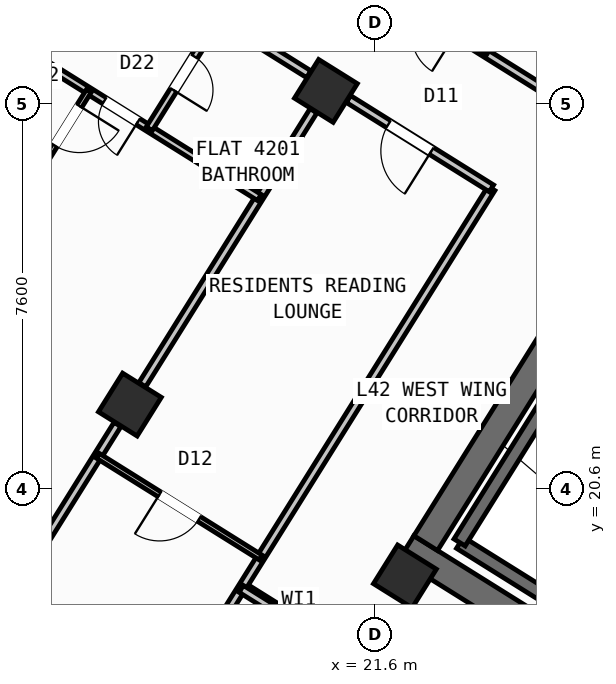
"""IFC4 building model, lengths in metres.
Left out: names, types, materials, properties, quantities, classifications, styles, units other than length and angle.
Written with IfcOpenShell. Run it as: python <this file> out.ifc"""

import sys

from ifc_helpers import new_model, si_unit, direction, frame, frame_2d, origin, origin_2d, place, context, subcontext, project, spatial, rectangle, hollow_rectangle, extrude, source, transform, mapped, element, fill, save


model = new_model("IFC4")
c1 = context("Model", 3, precision=1e-05, world=origin(), true_north=direction((0.0, 1.0)))
c2 = subcontext(c1, "Body", "Model", "MODEL_VIEW")
j1 = project(units=[si_unit("LENGTHUNIT", "METRE"), si_unit("PLANEANGLEUNIT", "RADIAN")], contexts=[c1])
p1 = place(None, origin())
s1 = spatial("IfcSite", under=j1, at=p1, CompositionType="ELEMENT")
p2 = place(p1, origin())
s2 = spatial("IfcBuilding", under=s1, at=p2, CompositionType="ELEMENT")
p3 = place(p2, frame((0.0, 0.0, 165.9)))
s3 = spatial("IfcBuildingStorey", under=s2, at=p3, CompositionType="ELEMENT", Elevation=165.9)
p4 = place(p3, frame((33.366, 12.477, 0.0), z_axis=(0.0, 0.0, 1.0), x_axis=(-0.848047359947, 0.529920442413, 0.0)))
e1 = element("IfcWall", 1, at=p4, inside=s3, PredefinedType="SHEAR", context=c2, shape_type="SweptSolid", body=[
    extrude(rectangle(XDim=13.14, YDim=0.55, at=frame_2d((6.57, 0.0))), origin(), (0.0, 0.0, 1.0), 3.32),
])
p5 = place(p3, frame((26.007, 24.976, 0.0), z_axis=(0.0, 0.0, 1.0), x_axis=(-0.529923795287, -0.848045264823, 0.0)))
e2 = element("IfcWall", 2, at=p5, inside=s3, PredefinedType="SHEAR", context=c2, shape_type="SweptSolid", body=[
    extrude(rectangle(XDim=6.425, YDim=0.55, at=frame_2d((3.212, 0.0))), origin(), (0.0, 0.0, 1.0), 3.32),
])
m1 = source(origin(), c2, "Body", "SweptSolid", [
    extrude(hollow_rectangle(XDim=0.9, YDim=0.9, WallThickness=0.036, at=origin_2d()), origin(), (0.0, 0.0, 1.0), 3.6),
])
for number, where, z_axis, x_axis in (
    (3, (22.191, 18.87, 0.0), (0.0, 0.0, 1.0), (-0.848, 0.53, 0.0)),
    (4, (20.632, 28.452, 0.0), (0.0, 0.0, 1.0), (-0.848, 0.53, 0.0)),
    (5, (16.764, 22.261, 0.0), (0.0, 0.0, 1.0), (-0.848, 0.53, 0.0)),
):
    element("IfcColumn", number, at=place(p3, frame(where, z_axis=z_axis, x_axis=x_axis)), inside=s3, PredefinedType="COLUMN", context=c2, shape_type="MappedRepresentation", body=[
        mapped(m1, transform((0.0, 0.0, 0.0), scale=1.0)),
    ])
p6 = place(p3, frame((29.268, 6.429, 0.0), z_axis=(0.0, 0.0, 1.0), x_axis=(-0.848049971435, 0.529916263149, 0.0)))
e6 = element("IfcWall", 6, at=p6, inside=s3, PredefinedType="STANDARD", context=c2, shape_type="SweptSolid", body=[
    extrude(rectangle(XDim=31.588, YDim=0.32, at=frame_2d((15.794, 0.0))), origin(), (0.0, 0.0, 1.0), 3.32),
])
p7 = place(p6, frame((16.362, 0.0, 0.0)))
e7 = element("IfcOpeningElement", 7, at=p7, cuts=e6, PredefinedType="OPENING", context=c2, shape_type="SweptSolid", body=[
    extrude(rectangle(XDim=1.2, YDim=2.15, at=frame_2d((0.6, 1.075))), frame((0.0, 0.17, 0.0), z_axis=(0.0, -1.0, 0.0), x_axis=(1.0, 0.0, 0.0)), (0.0, 0.0, 1.0), 0.34),
])
p8 = place(p6, frame((2.989, 0.0, 0.8)))
e8 = element("IfcOpeningElement", 8, at=p8, cuts=e6, PredefinedType="OPENING", context=c2, shape_type="SweptSolid", body=[
    extrude(rectangle(XDim=2.1, YDim=1.55, at=frame_2d((1.05, 0.775))), frame((0.0, 0.17, 0.0), z_axis=(0.0, -1.0, 0.0), x_axis=(1.0, 0.0, 0.0)), (0.0, 0.0, 1.0), 0.34),
])
p9 = place(p6, frame((8.359, 0.0, 0.8)))
e9 = element("IfcOpeningElement", 9, at=p9, cuts=e6, PredefinedType="OPENING", context=c2, shape_type="SweptSolid", body=[
    extrude(rectangle(XDim=2.1, YDim=1.55, at=frame_2d((1.05, 0.775))), frame((0.0, 0.17, 0.0), z_axis=(0.0, -1.0, 0.0), x_axis=(1.0, 0.0, 0.0)), (0.0, 0.0, 1.0), 0.34),
])
p10 = place(p6, frame((13.284, 0.0, 0.95)))
e10 = element("IfcOpeningElement", 10, at=p10, cuts=e6, PredefinedType="OPENING", context=c2, shape_type="SweptSolid", body=[
    extrude(rectangle(XDim=1.2, YDim=1.4, at=frame_2d((0.6, 0.7))), frame((0.0, 0.17, 0.0), z_axis=(0.0, -1.0, 0.0), x_axis=(1.0, 0.0, 0.0)), (0.0, 0.0, 1.0), 0.34),
])
p11 = place(p6, frame((20.39, 0.0, 0.95)))
e11 = element("IfcOpeningElement", 11, at=p11, cuts=e6, PredefinedType="OPENING", context=c2, shape_type="SweptSolid", body=[
    extrude(rectangle(XDim=1.2, YDim=1.4, at=frame_2d((0.6, 0.7))), frame((0.0, 0.17, 0.0), z_axis=(0.0, -1.0, 0.0), x_axis=(1.0, 0.0, 0.0)), (0.0, 0.0, 1.0), 0.34),
])
p12 = place(p6, frame((23.715, 0.0, 1.0)))
e12 = element("IfcOpeningElement", 12, at=p12, cuts=e6, PredefinedType="OPENING", context=c2, shape_type="SweptSolid", body=[
    extrude(rectangle(XDim=0.9, YDim=1.25, at=frame_2d((0.45, 0.625))), frame((0.0, 0.17, 0.0), z_axis=(0.0, -1.0, 0.0), x_axis=(1.0, 0.0, 0.0)), (0.0, 0.0, 1.0), 0.34),
])
p13 = place(p6, frame((26.106, 0.0, 0.85)))
e13 = element("IfcOpeningElement", 13, at=p13, cuts=e6, PredefinedType="OPENING", context=c2, shape_type="SweptSolid", body=[
    extrude(rectangle(XDim=1.5, YDim=1.5, at=frame_2d((0.75, 0.75))), frame((0.0, 0.17, 0.0), z_axis=(0.0, -1.0, 0.0), x_axis=(1.0, 0.0, 0.0)), (0.0, 0.0, 1.0), 0.34),
])
p14 = place(p6, frame((29.068, 0.0, 0.85)))
e14 = element("IfcOpeningElement", 14, at=p14, cuts=e6, PredefinedType="OPENING", context=c2, shape_type="SweptSolid", body=[
    extrude(rectangle(XDim=1.8, YDim=1.5, at=frame_2d((0.9, 0.75))), frame((0.0, 0.17, 0.0), z_axis=(0.0, -1.0, 0.0), x_axis=(1.0, 0.0, 0.0)), (0.0, 0.0, 1.0), 0.34),
])
p15 = place(p3, frame((14.138, 41.825, 0.0), z_axis=(0.0, 0.0, 1.0), x_axis=(0.848046498049, -0.529921821731, 0.0)))
e15 = element("IfcWall", 15, at=p15, inside=s3, PredefinedType="STANDARD", context=c2, shape_type="SweptSolid", body=[
    extrude(rectangle(XDim=31.588, YDim=0.32, at=frame_2d((15.794, 0.0))), origin(), (0.0, 0.0, 1.0), 3.32),
])
p16 = place(p15, frame((3.253, 0.0, 0.0)))
e16 = element("IfcOpeningElement", 16, at=p16, cuts=e15, PredefinedType="OPENING", context=c2, shape_type="SweptSolid", body=[
    extrude(rectangle(XDim=1.05, YDim=2.15, at=frame_2d((0.525, 1.075))), frame((0.0, 0.17, 0.0), z_axis=(0.0, -1.0, 0.0), x_axis=(1.0, 0.0, 0.0)), (0.0, 0.0, 1.0), 0.34),
])
p17 = place(p15, frame((0.863, 0.0, 0.85)))
e17 = element("IfcOpeningElement", 17, at=p17, cuts=e15, PredefinedType="OPENING", context=c2, shape_type="SweptSolid", body=[
    extrude(rectangle(XDim=1.8, YDim=1.5, at=frame_2d((0.9, 0.75))), frame((0.0, 0.17, 0.0), z_axis=(0.0, -1.0, 0.0), x_axis=(1.0, 0.0, 0.0)), (0.0, 0.0, 1.0), 0.34),
])
p18 = place(p15, frame((8.494, 0.0, 0.85)))
e18 = element("IfcOpeningElement", 18, at=p18, cuts=e15, PredefinedType="OPENING", context=c2, shape_type="SweptSolid", body=[
    extrude(rectangle(XDim=1.8, YDim=1.5, at=frame_2d((0.9, 0.75))), frame((0.0, 0.17, 0.0), z_axis=(0.0, -1.0, 0.0), x_axis=(1.0, 0.0, 0.0)), (0.0, 0.0, 1.0), 0.34),
])
p19 = place(p15, frame((13.874, 0.0, 0.85)))
e19 = element("IfcOpeningElement", 19, at=p19, cuts=e15, PredefinedType="OPENING", context=c2, shape_type="SweptSolid", body=[
    extrude(rectangle(XDim=1.5, YDim=1.5, at=frame_2d((0.75, 0.75))), frame((0.0, 0.17, 0.0), z_axis=(0.0, -1.0, 0.0), x_axis=(1.0, 0.0, 0.0)), (0.0, 0.0, 1.0), 0.34),
])
p20 = place(p15, frame((17.104, 0.0, 1.0)))
e20 = element("IfcOpeningElement", 20, at=p20, cuts=e15, PredefinedType="OPENING", context=c2, shape_type="SweptSolid", body=[
    extrude(rectangle(XDim=0.9, YDim=1.25, at=frame_2d((0.45, 0.625))), frame((0.0, 0.17, 0.0), z_axis=(0.0, -1.0, 0.0), x_axis=(1.0, 0.0, 0.0)), (0.0, 0.0, 1.0), 0.34),
])
p21 = place(p15, frame((22.144, 0.0, 1.0)))
e21 = element("IfcOpeningElement", 21, at=p21, cuts=e15, PredefinedType="OPENING", context=c2, shape_type="SweptSolid", body=[
    extrude(rectangle(XDim=0.9, YDim=1.25, at=frame_2d((0.45, 0.625))), frame((0.0, 0.17, 0.0), z_axis=(0.0, -1.0, 0.0), x_axis=(1.0, 0.0, 0.0)), (0.0, 0.0, 1.0), 0.34),
])
p22 = place(p15, frame((27.744, 0.0, 1.0)))
e22 = element("IfcOpeningElement", 22, at=p22, cuts=e15, PredefinedType="OPENING", context=c2, shape_type="SweptSolid", body=[
    extrude(rectangle(XDim=0.9, YDim=1.25, at=frame_2d((0.45, 0.625))), frame((0.0, 0.17, 0.0), z_axis=(0.0, -1.0, 0.0), x_axis=(1.0, 0.0, 0.0)), (0.0, 0.0, 1.0), 0.34),
])
p23 = place(p3, frame((29.605, 15.581, 0.0), z_axis=(0.0, 0.0, 1.0), x_axis=(-0.848036911448, 0.529937163087, 0.0)))
e23 = element("IfcWall", 23, at=p23, inside=s3, PredefinedType="SHEAR", context=c2, shape_type="SweptSolid", body=[
    extrude(rectangle(XDim=7.46, YDim=0.26, at=frame_2d((3.73, 0.0))), origin(), (0.0, 0.0, 1.0), 3.32),
])
p24 = place(p3, frame((24.945, 22.22, 0.0), z_axis=(0.0, 0.0, 1.0), x_axis=(-0.529908658664, -0.84805472316, 0.0)))
e24 = element("IfcWall", 24, at=p24, inside=s3, PredefinedType="SHEAR", context=c2, shape_type="SweptSolid", body=[
    extrude(rectangle(XDim=3.16, YDim=0.26, at=frame_2d((1.58, 0.0))), origin(), (0.0, 0.0, 1.0), 3.32),
])
p25 = place(p3, frame((21.206, 17.292, 0.0), z_axis=(0.0, 0.0, 1.0), x_axis=(-0.848050851465, 0.529914854792, 0.0)))
e25 = element("IfcWall", 25, at=p25, inside=s3, PredefinedType="PARTITIONING", context=c2, shape_type="SweptSolid", body=[
    extrude(rectangle(XDim=2.61, YDim=0.16, at=frame_2d((1.305, 0.0))), origin(), (0.0, 0.0, 1.0), 3.31),
])
p26 = place(p3, frame((23.899, 26.529, 0.0), z_axis=(0.0, 0.0, 1.0), x_axis=(-0.529917716469, -0.848049063305, 0.0)))
e26 = element("IfcWall", 26, at=p26, inside=s3, PredefinedType="PARTITIONING", context=c2, shape_type="SweptSolid", body=[
    extrude(rectangle(XDim=14.05, YDim=0.16, at=frame_2d((7.025, 0.0))), origin(), (0.0, 0.0, 1.0), 3.31),
])
p27 = place(p3, frame((25.065, 28.394, 0.0), z_axis=(0.0, 0.0, 1.0), x_axis=(-0.848048310262, 0.529918921593, 0.0)))
e27 = element("IfcWall", 27, at=p27, inside=s3, PredefinedType="PARTITIONING", context=c2, shape_type="SweptSolid", body=[
    extrude(rectangle(XDim=16.73, YDim=0.16, at=frame_2d((8.365, 0.0))), origin(), (0.0, 0.0, 1.0), 3.31),
])
p28 = place(p27, frame((2.22, 0.0, 0.0)))
e28 = element("IfcOpeningElement", 28, at=p28, cuts=e27, PredefinedType="OPENING", context=c2, shape_type="SweptSolid", body=[
    extrude(rectangle(XDim=0.86, YDim=2.05, at=frame_2d((0.43, 1.025))), frame((0.0, 0.09, 0.0), z_axis=(0.0, -1.0, 0.0), x_axis=(1.0, 0.0, 0.0)), (0.0, 0.0, 1.0), 0.18),
])
p29 = place(p27, frame((7.82, 0.0, 0.0)))
e29 = element("IfcOpeningElement", 29, at=p29, cuts=e27, PredefinedType="OPENING", context=c2, shape_type="SweptSolid", body=[
    extrude(rectangle(XDim=1.0, YDim=2.1, at=frame_2d((0.5, 1.05))), frame((0.0, 0.09, 0.0), z_axis=(0.0, -1.0, 0.0), x_axis=(1.0, 0.0, 0.0)), (0.0, 0.0, 1.0), 0.18),
])
p30 = place(p27, frame((12.95, 0.0, 0.0)))
e30 = element("IfcOpeningElement", 30, at=p30, cuts=e27, PredefinedType="OPENING", context=c2, shape_type="SweptSolid", body=[
    extrude(rectangle(XDim=1.0, YDim=2.1, at=frame_2d((0.5, 1.05))), frame((0.0, 0.09, 0.0), z_axis=(0.0, -1.0, 0.0), x_axis=(1.0, 0.0, 0.0)), (0.0, 0.0, 1.0), 0.18),
])
p31 = place(p3, frame((23.899, 26.529, 0.0), z_axis=(0.0, 0.0, 1.0), x_axis=(-0.848064240775, 0.529893426567, 0.0)))
e31 = element("IfcWall", 31, at=p31, inside=s3, PredefinedType="PARTITIONING", context=c2, shape_type="SweptSolid", body=[
    extrude(rectangle(XDim=3.328, YDim=0.16, at=frame_2d((1.664, 0.0))), origin(), (0.0, 0.0, 1.0), 2.795),
])
p32 = place(p31, frame((1.395, 0.0, 0.0)))
e32 = element("IfcOpeningElement", 32, at=p32, cuts=e31, PredefinedType="OPENING", context=c2, shape_type="SweptSolid", body=[
    extrude(rectangle(XDim=1.0, YDim=2.1, at=frame_2d((0.5, 1.05))), frame((0.0, 0.09, 0.0), z_axis=(0.0, -1.0, 0.0), x_axis=(1.0, 0.0, 0.0)), (0.0, 0.0, 1.0), 0.18),
])
p33 = place(p3, frame((20.293, 28.782, 0.0), z_axis=(0.0, 0.0, 1.0), x_axis=(-0.848040881926, 0.529930809241, 0.0)))
e33 = element("IfcWall", 33, at=p33, inside=s3, PredefinedType="PARTITIONING", context=c2, shape_type="SweptSolid", body=[
    extrude(rectangle(XDim=5.476, YDim=0.16, at=frame_2d((2.738, 0.0))), origin(), (0.0, 0.0, 1.0), 2.795),
])
p34 = place(p33, frame((3.568, 0.0, 0.0)))
e34 = element("IfcOpeningElement", 34, at=p34, cuts=e33, PredefinedType="OPENING", context=c2, shape_type="SweptSolid", body=[
    extrude(rectangle(XDim=1.0, YDim=2.1, at=frame_2d((0.5, 1.05))), frame((0.0, 0.09, 0.0), z_axis=(0.0, -1.0, 0.0), x_axis=(1.0, 0.0, 0.0)), (0.0, 0.0, 1.0), 0.18),
])
p35 = place(p3, frame((20.387, 28.06, 0.0), z_axis=(0.0, 0.0, 1.0), x_axis=(-0.529902564924, -0.848058530814, 0.0)))
e35 = element("IfcWall", 35, at=p35, inside=s3, PredefinedType="PARTITIONING", context=c2, shape_type="SweptSolid", body=[
    extrude(rectangle(XDim=6.376, YDim=0.16, at=frame_2d((3.188, 0.0))), origin(), (0.0, 0.0, 1.0), 2.795),
])
p36 = place(p3, frame((16.519, 21.87, 0.0), z_axis=(0.0, 0.0, 1.0), x_axis=(-0.529922447305, -0.848046107144, 0.0)))
e36 = element("IfcWall", 36, at=p36, inside=s3, PredefinedType="PARTITIONING", context=c2, shape_type="SweptSolid", body=[
    extrude(rectangle(XDim=5.451, YDim=0.16, at=frame_2d((2.726, 0.0))), origin(), (0.0, 0.0, 1.0), 2.795),
])
p37 = place(p3, frame((19.346, 19.242, 0.0), z_axis=(0.0, 0.0, 1.0), x_axis=(-0.848059820872, 0.529900500304, 0.0)))
e37 = element("IfcWall", 37, at=p37, inside=s3, PredefinedType="PARTITIONING", context=c2, shape_type="SweptSolid", body=[
    extrude(rectangle(XDim=3.79, YDim=0.11, at=frame_2d((1.895, 0.0))), origin(), (0.0, 0.0, 1.0), 3.31),
])
p38 = place(p37, frame((1.435, 0.0, 0.0)))
e38 = element("IfcOpeningElement", 38, at=p38, cuts=e37, PredefinedType="OPENING", context=c2, shape_type="SweptSolid", body=[
    extrude(rectangle(XDim=0.92, YDim=2.08, at=frame_2d((0.46, 1.04))), frame((0.0, 0.065, 0.0), z_axis=(0.0, -1.0, 0.0), x_axis=(1.0, 0.0, 0.0)), (0.0, 0.0, 1.0), 0.13),
])
p39 = place(p3, frame((19.318, 26.349, 0.0), z_axis=(0.0, 0.0, 1.0), x_axis=(-0.848039019877, 0.529933789039, 0.0)))
e39 = element("IfcWall", 39, at=p39, inside=s3, PredefinedType="PLUMBINGWALL", context=c2, shape_type="SweptSolid", body=[
    extrude(rectangle(XDim=6.4, YDim=0.14, at=frame_2d((3.2, 0.0))), origin(), (0.0, 0.0, 1.0), 3.31),
])
p40 = place(p39, frame((2.824, 0.0, 0.0)))
e40 = element("IfcOpeningElement", 40, at=p40, cuts=e39, PredefinedType="OPENING", context=c2, shape_type="SweptSolid", body=[
    extrude(rectangle(XDim=0.78, YDim=2.05, at=frame_2d((0.39, 1.025))), frame((0.0, 0.08, 0.0), z_axis=(0.0, -1.0, 0.0), x_axis=(1.0, 0.0, 0.0)), (0.0, 0.0, 1.0), 0.16),
])
p41 = place(p3, frame((18.514, 29.894, 0.0), z_axis=(0.0, 0.0, 1.0), x_axis=(-0.529913878929, -0.848051461244, 0.0)))
e41 = element("IfcWall", 41, at=p41, inside=s3, PredefinedType="PLUMBINGWALL", context=c2, shape_type="SweptSolid", body=[
    extrude(rectangle(XDim=2.58, YDim=0.14, at=frame_2d((1.29, 0.0))), origin(), (0.0, 0.0, 1.0), 3.31),
])
p42 = place(p41, frame((0.9, 0.0, 0.0)))
e42 = element("IfcOpeningElement", 42, at=p42, cuts=e41, PredefinedType="OPENING", context=c2, shape_type="SweptSolid", body=[
    extrude(rectangle(XDim=0.78, YDim=2.05, at=frame_2d((0.39, 1.025))), frame((0.0, 0.08, 0.0), z_axis=(0.0, -1.0, 0.0), x_axis=(1.0, 0.0, 0.0)), (0.0, 0.0, 1.0), 0.16),
])
p43 = place(p3, frame((15.953, 28.452, 0.0), z_axis=(0.0, 0.0, 1.0), x_axis=(-0.529931645041, -0.848040359643, 0.0)))
e43 = element("IfcWall", 43, at=p43, inside=s3, PredefinedType="PARTITIONING", context=c2, shape_type="SweptSolid", body=[
    extrude(rectangle(XDim=11.74, YDim=0.11, at=frame_2d((5.87, 0.0))), origin(), (0.0, 0.0, 1.0), 3.31),
])
p44 = place(p43, frame((0.35, 0.0, 0.0)))
e44 = element("IfcOpeningElement", 44, at=p44, cuts=e43, PredefinedType="OPENING", context=c2, shape_type="SweptSolid", body=[
    extrude(rectangle(XDim=0.92, YDim=2.08, at=frame_2d((0.46, 1.04))), frame((0.0, 0.065, 0.0), z_axis=(0.0, -1.0, 0.0), x_axis=(1.0, 0.0, 0.0)), (0.0, 0.0, 1.0), 0.13),
])
p45 = place(p3, frame((25.324, 31.734, 0.0), z_axis=(0.0, 0.0, 1.0), x_axis=(-0.529873322326, -0.848076802116, 0.0)))
e45 = element("IfcWall", 45, at=p45, inside=s3, PredefinedType="PLUMBINGWALL", context=c2, shape_type="SweptSolid", body=[
    extrude(rectangle(XDim=2.97, YDim=0.14, at=frame_2d((1.485, 0.0))), origin(), (0.0, 0.0, 1.0), 2.935),
])
p46 = place(p45, frame((1.095, 0.0, 0.0)))
e46 = element("IfcOpeningElement", 46, at=p46, cuts=e45, PredefinedType="OPENING", context=c2, shape_type="SweptSolid", body=[
    extrude(rectangle(XDim=0.78, YDim=2.05, at=frame_2d((0.39, 1.025))), frame((0.0, 0.08, 0.0), z_axis=(0.0, -1.0, 0.0), x_axis=(1.0, 0.0, 0.0)), (0.0, 0.0, 1.0), 0.16),
])
p47 = place(p3, frame((32.164, 10.374, 0.0), z_axis=(0.0, 0.0, 1.0), x_axis=(-0.848044107957, 0.529925646633, 0.0)))
e47 = element("IfcWall", 47, at=p47, inside=s3, PredefinedType="PARTITIONING", context=c2, shape_type="SweptSolid", body=[
    extrude(rectangle(XDim=15.57, YDim=0.16, at=frame_2d((7.785, 0.0))), origin(), (0.0, 0.0, 1.0), 3.31),
])
p48 = place(p47, frame((10.83, 0.0, 0.0)))
e48 = element("IfcOpeningElement", 48, at=p48, cuts=e47, PredefinedType="OPENING", context=c2, shape_type="SweptSolid", body=[
    extrude(rectangle(XDim=1.0, YDim=2.1, at=frame_2d((0.5, 1.05))), frame((0.0, 0.09, 0.0), z_axis=(0.0, -1.0, 0.0), x_axis=(1.0, 0.0, 0.0)), (0.0, 0.0, 1.0), 0.18),
])
m2 = source(origin(), c2, "Body", "SweptSolid", [
    extrude(rectangle(XDim=1.0, YDim=2.1, at=frame_2d((0.5, 1.05))), frame((0.0, 0.025, 0.0), z_axis=(0.0, -1.0, 0.0), x_axis=(1.0, 0.0, 0.0)), (0.0, 0.0, 1.0), 0.05),
])
p49 = place(p32, origin())
e49 = element("IfcDoor", 49, at=p49, inside=s3, OperationType="SINGLE_SWING_LEFT", PredefinedType="DOOR", context=c2, shape_type="MappedRepresentation", body=[
    mapped(m2, transform((0.0, 0.0, 0.0), scale=1.0)),
])
fill(e32, e49)
m3 = source(origin(), c2, "Body", "SweptSolid", [
    extrude(rectangle(XDim=0.92, YDim=2.08, at=frame_2d((0.46, 1.04))), frame((0.0, 0.025, 0.0), z_axis=(0.0, -1.0, 0.0), x_axis=(1.0, 0.0, 0.0)), (0.0, 0.0, 1.0), 0.05),
])
p50 = place(p38, origin())
e50 = element("IfcDoor", 50, at=p50, inside=s3, OperationType="SINGLE_SWING_RIGHT", PredefinedType="DOOR", context=c2, shape_type="MappedRepresentation", body=[
    mapped(m3, transform((0.0, 0.0, 0.0), scale=1.0)),
])
fill(e38, e50)
p51 = place(p44, origin())
e51 = element("IfcDoor", 51, at=p51, inside=s3, OperationType="SINGLE_SWING_LEFT", PredefinedType="DOOR", context=c2, shape_type="MappedRepresentation", body=[
    mapped(m3, transform((0.0, 0.0, 0.0), scale=1.0)),
])
fill(e44, e51)
m4 = source(origin(), c2, "Body", "SweptSolid", [
    extrude(rectangle(XDim=0.78, YDim=2.05, at=frame_2d((0.39, 1.025))), frame((0.0, 0.025, 0.0), z_axis=(0.0, -1.0, 0.0), x_axis=(1.0, 0.0, 0.0)), (0.0, 0.0, 1.0), 0.05),
])
p52 = place(p40, origin())
e52 = element("IfcDoor", 52, at=p52, inside=s3, OperationType="SINGLE_SWING_LEFT", PredefinedType="DOOR", context=c2, shape_type="MappedRepresentation", body=[
    mapped(m4, transform((0.0, 0.0, 0.0), scale=1.0)),
])
fill(e40, e52)
p53 = place(p42, origin())
e53 = element("IfcDoor", 53, at=p53, inside=s3, OperationType="SINGLE_SWING_RIGHT", PredefinedType="DOOR", context=c2, shape_type="MappedRepresentation", body=[
    mapped(m4, transform((0.0, 0.0, 0.0), scale=1.0)),
])
fill(e42, e53)
save(model, sys.argv[1])
